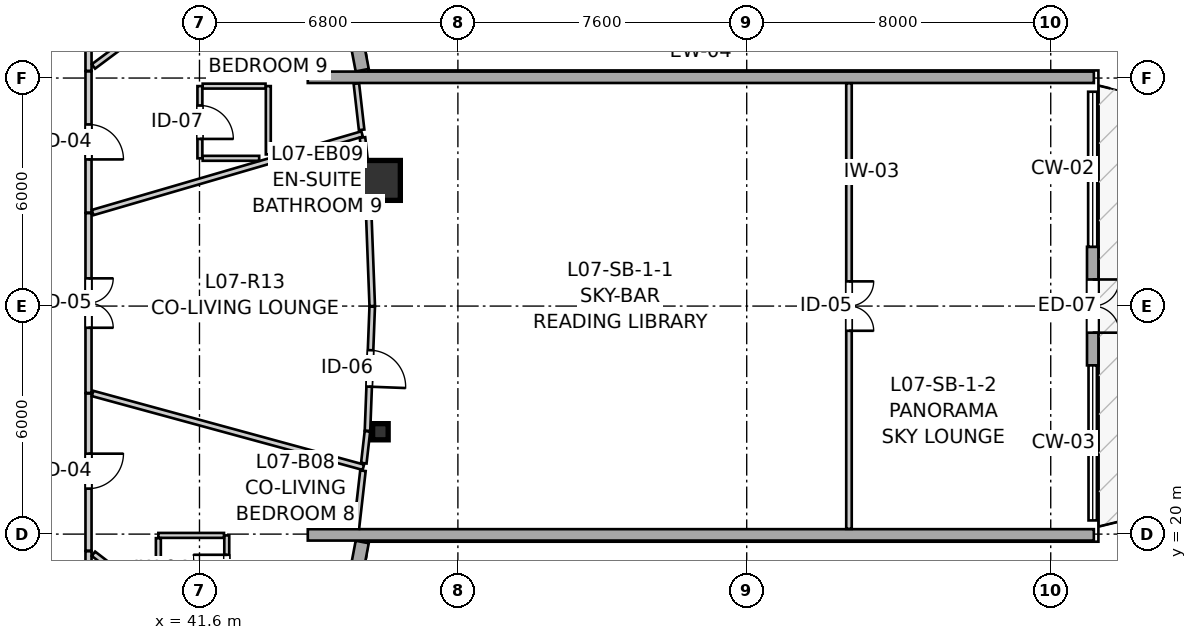
"""IFC4 building model, lengths in metres.
Left out: names, types, materials, properties, quantities, classifications, styles, units other than length and angle.
Written with IfcOpenShell. Run it as: python <this file> out.ifc"""

import sys

from ifc_helpers import new_model, si_unit, direction, frame, frame_2d, origin, origin_2d, place, context, subcontext, project, spatial, rectangle, i_section, extrude, source, transform, mapped, element, fill, save


model = new_model("IFC4")
c1 = context("Model", 3, precision=1e-05, world=origin(), true_north=direction((0.0, 1.0)))
c2 = subcontext(c1, "Body", "Model", "MODEL_VIEW")
j1 = project(units=[si_unit("LENGTHUNIT", "METRE"), si_unit("PLANEANGLEUNIT", "RADIAN")], contexts=[c1])
p1 = place(None, origin())
s1 = spatial("IfcSite", under=j1, at=p1, CompositionType="ELEMENT")
p2 = place(p1, origin())
s2 = spatial("IfcBuilding", under=s1, at=p2, CompositionType="ELEMENT")
p3 = place(p2, frame((0.0, 0.0, 27.0)))
s3 = spatial("IfcBuildingStorey", under=s2, at=p3, CompositionType="ELEMENT", Elevation=27.0)
m1 = source(origin(), c2, "Body", "SweptSolid", [
    extrude(i_section(OverallWidth=0.409, OverallDepth=0.425, WebThickness=0.03, FlangeThickness=0.048, FilletRadius=0.015, at=origin_2d()), origin(), (0.0, 0.0, 1.0), 2.935),
])
p4 = place(p3, frame((46.361, 22.694, 0.0), z_axis=(0.0, 0.0, 1.0), x_axis=(1.0, 0.0, 0.0)))
e1 = element("IfcColumn", 1, at=p4, inside=s3, PredefinedType="PILASTER", context=c2, shape_type="MappedRepresentation", body=[
    mapped(m1, transform((0.0, 0.0, 0.0), x_axis=(1.0, 0.0, 0.0), y_axis=(0.0, 1.0, 0.0), z_axis=(0.0, 0.0, 1.0), scale=1.0)),
])
m2 = source(origin(), c2, "Body", "SweptSolid", [
    extrude(rectangle(XDim=1.05, YDim=1.05, at=origin_2d()), origin(), (0.0, 0.0, 1.0), 2.935),
])
p5 = place(p3, frame((46.361, 29.306, 0.0), z_axis=(0.0, 0.0, 1.0), x_axis=(1.0, 0.0, 0.0)))
e2 = element("IfcColumn", 2, at=p5, inside=s3, PredefinedType="COLUMN", context=c2, shape_type="MappedRepresentation", body=[
    mapped(m2, transform((0.0, 0.0, 0.0), x_axis=(1.0, 0.0, 0.0), y_axis=(0.0, 1.0, 0.0), z_axis=(0.0, 0.0, 1.0), scale=1.0)),
])
p6 = place(p3, frame((45.24, 16.408, 0.0), z_axis=(0.0, 0.0, 1.0), x_axis=(0.186636709983, 0.982428999209, 0.0)))
e3 = element("IfcWall", 3, at=p6, inside=s3, PredefinedType="SOLIDWALL", context=c2, shape_type="SweptSolid", body=[
    extrude(rectangle(XDim=3.446, YDim=0.35, at=frame_2d((1.723, 0.0))), origin(), (0.0, 0.0, 1.0), 2.415),
])
p7 = place(p6, frame((0.828, 0.0, 0.82)))
e4 = element("IfcOpeningElement", 4, at=p7, cuts=e3, PredefinedType="OPENING", context=c2, shape_type="SweptSolid", body=[
    extrude(rectangle(XDim=1.45, YDim=1.25, at=frame_2d((0.725, 0.625))), frame((0.0, 0.185, 0.0), z_axis=(0.0, -1.0, 0.0), x_axis=(1.0, 0.0, 0.0)), (0.0, 0.0, 1.0), 0.37),
])
p8 = place(p3, frame((45.883, 32.207, 0.0), z_axis=(0.0, 0.0, 1.0), x_axis=(-0.186693533797, 0.982418202416, 0.0)))
e5 = element("IfcWall", 5, at=p8, inside=s3, PredefinedType="SOLIDWALL", context=c2, shape_type="SweptSolid", body=[
    extrude(rectangle(XDim=3.726, YDim=0.35, at=frame_2d((1.863, 0.0))), origin(), (0.0, 0.0, 1.0), 2.415),
])
p9 = place(p8, frame((1.313, 0.0, 0.82)))
e6 = element("IfcOpeningElement", 6, at=p9, cuts=e5, PredefinedType="OPENING", context=c2, shape_type="SweptSolid", body=[
    extrude(rectangle(XDim=1.45, YDim=1.25, at=frame_2d((0.725, 0.625))), frame((0.0, 0.185, 0.0), z_axis=(0.0, -1.0, 0.0), x_axis=(1.0, 0.0, 0.0)), (0.0, 0.0, 1.0), 0.37),
])
for number, where, z_axis, x_axis in (
    (7, (44.45, 32.02, 0.0), (0.0, 0.0, 1.0), (1.0, 0.0, 0.0)),
    (8, (44.45, 19.98, 0.0), (0.0, 0.0, 1.0), (1.0, 0.0, 0.0)),
):
    element("IfcWall", number, at=place(p3, frame(where, z_axis=z_axis, x_axis=x_axis)), inside=s3, PredefinedType="SOLIDWALL", context=c2, shape_type="SweptSolid", body=[
        extrude(rectangle(XDim=20.685, YDim=0.3, at=frame_2d((10.342, 0.0))), origin(), (0.0, 0.0, 1.0), 2.115),
    ])
p10 = place(p3, frame((65.104, 27.56, 0.0), z_axis=(0.0, 0.0, 1.0), x_axis=(0.0, -1.0, 0.0)))
e9 = element("IfcWall", 9, at=p10, inside=s3, PredefinedType="SOLIDWALL", context=c2, shape_type="SweptSolid", body=[
    extrude(rectangle(XDim=3.12, YDim=0.3, at=frame_2d((1.56, 0.0))), origin(), (0.0, 0.0, 1.0), 2.3),
])
p11 = place(p10, frame((0.86, 0.0, 0.0)))
e10 = element("IfcOpeningElement", 10, at=p11, cuts=e9, PredefinedType="OPENING", context=c2, shape_type="SweptSolid", body=[
    extrude(rectangle(XDim=1.4, YDim=2.15, at=frame_2d((0.7, 1.075))), frame((0.0, 0.16, 0.0), z_axis=(0.0, -1.0, 0.0), x_axis=(1.0, 0.0, 0.0)), (0.0, 0.0, 1.0), 0.32),
])
p12 = place(p3, frame((58.691, 31.862, 0.0), z_axis=(0.0, 0.0, 1.0), x_axis=(0.0, -1.0, 0.0)))
e11 = element("IfcWall", 11, at=p12, inside=s3, PredefinedType="PARTITIONING", context=c2, shape_type="SweptSolid", body=[
    extrude(rectangle(XDim=11.724, YDim=0.145, at=frame_2d((5.862, 0.0))), origin(), (0.0, 0.0, 1.0), 2.353),
])
p13 = place(p12, frame((5.212, 0.0, 0.0)))
e12 = element("IfcOpeningElement", 12, at=p13, cuts=e11, PredefinedType="OPENING", context=c2, shape_type="SweptSolid", body=[
    extrude(rectangle(XDim=1.3, YDim=2.1, at=frame_2d((0.65, 1.05))), frame((0.0, 0.083, 0.0), z_axis=(0.0, -1.0, 0.0), x_axis=(1.0, 0.0, 0.0)), (0.0, 0.0, 1.0), 0.165),
])
p14 = place(p3, frame((38.68, 28.445, 0.0), z_axis=(0.0, 0.0, 1.0), x_axis=(0.0, -1.0, 0.0)))
e13 = element("IfcWall", 13, at=p14, inside=s3, PredefinedType="PARTITIONING", context=c2, shape_type="SweptSolid", body=[
    extrude(rectangle(XDim=4.731, YDim=0.16, at=frame_2d((2.365, 0.0))), origin(), (0.0, 0.0, 1.0), 2.935),
])
p15 = place(p14, frame((1.716, 0.0, 0.0)))
e14 = element("IfcOpeningElement", 14, at=p15, cuts=e13, PredefinedType="OPENING", context=c2, shape_type="SweptSolid", body=[
    extrude(rectangle(XDim=1.3, YDim=2.1, at=frame_2d((0.65, 1.05))), frame((0.0, 0.09, 0.0), z_axis=(0.0, -1.0, 0.0), x_axis=(1.0, 0.0, 0.0)), (0.0, 0.0, 1.0), 0.18),
])
p16 = place(p3, frame((38.68, 36.58, 0.0), z_axis=(0.0, 0.0, 1.0), x_axis=(0.0, -1.0, 0.0)))
e15 = element("IfcWall", 15, at=p16, inside=s3, PredefinedType="PARTITIONING", context=c2, shape_type="SweptSolid", body=[
    extrude(rectangle(XDim=4.39, YDim=0.16, at=frame_2d((2.195, 0.0))), origin(), (0.0, 0.0, 1.0), 2.935),
])
p17 = place(p16, frame((1.726, 0.0, 0.0)))
e16 = element("IfcOpeningElement", 16, at=p17, cuts=e15, PredefinedType="OPENING", context=c2, shape_type="SweptSolid", body=[
    extrude(rectangle(XDim=0.92, YDim=2.1, at=frame_2d((0.46, 1.05))), frame((0.0, 0.09, 0.0), z_axis=(0.0, -1.0, 0.0), x_axis=(1.0, 0.0, 0.0)), (0.0, 0.0, 1.0), 0.18),
])
p18 = place(p3, frame((38.68, 23.699, 0.0), z_axis=(0.0, 0.0, 1.0), x_axis=(0.0, -1.0, 0.0)))
e17 = element("IfcWall", 17, at=p18, inside=s3, PredefinedType="PARTITIONING", context=c2, shape_type="SweptSolid", body=[
    extrude(rectangle(XDim=4.135, YDim=0.16, at=frame_2d((2.067, 0.0))), origin(), (0.0, 0.0, 1.0), 2.935),
])
p19 = place(p18, frame((1.583, 0.0, 0.0)))
e18 = element("IfcOpeningElement", 18, at=p19, cuts=e17, PredefinedType="OPENING", context=c2, shape_type="SweptSolid", body=[
    extrude(rectangle(XDim=0.92, YDim=2.1, at=frame_2d((0.46, 1.05))), frame((0.0, 0.09, 0.0), z_axis=(0.0, -1.0, 0.0), x_axis=(1.0, 0.0, 0.0)), (0.0, 0.0, 1.0), 0.18),
])
p20 = place(p3, frame((38.68, 32.175, 0.0), z_axis=(0.0, 0.0, 1.0), x_axis=(0.0, -1.0, 0.0)))
e19 = element("IfcWall", 19, at=p20, inside=s3, PredefinedType="PARTITIONING", context=c2, shape_type="SweptSolid", body=[
    extrude(rectangle(XDim=3.715, YDim=0.16, at=frame_2d((1.857, 0.0))), origin(), (0.0, 0.0, 1.0), 2.935),
])
p21 = place(p20, frame((1.396, 0.0, 0.0)))
e20 = element("IfcOpeningElement", 20, at=p21, cuts=e19, PredefinedType="OPENING", context=c2, shape_type="SweptSolid", body=[
    extrude(rectangle(XDim=0.92, YDim=2.1, at=frame_2d((0.46, 1.05))), frame((0.0, 0.09, 0.0), z_axis=(0.0, -1.0, 0.0), x_axis=(1.0, 0.0, 0.0)), (0.0, 0.0, 1.0), 0.18),
])
p22 = place(p3, frame((46.146, 25.985, 0.0), z_axis=(0.0, 0.0, 1.0), x_axis=(-0.038094618751, -0.999274136572, 0.0)))
e21 = element("IfcWall", 21, at=p22, inside=s3, PredefinedType="PARTITIONING", context=c2, shape_type="SweptSolid", body=[
    extrude(rectangle(XDim=3.269, YDim=0.145, at=frame_2d((1.634, 0.0))), origin(), (0.0, 0.0, 1.0), 2.403),
])
p23 = place(p22, frame((1.147, 0.0, 0.0)))
e22 = element("IfcOpeningElement", 22, at=p23, cuts=e21, PredefinedType="OPENING", context=c2, shape_type="SweptSolid", body=[
    extrude(rectangle(XDim=0.96, YDim=2.1, at=frame_2d((0.48, 1.05))), frame((0.0, 0.083, 0.0), z_axis=(0.0, -1.0, 0.0), x_axis=(1.0, 0.0, 0.0)), (0.0, 0.0, 1.0), 0.165),
])
p24 = place(p3, frame((38.68, 19.549, 0.0), z_axis=(0.0, 0.0, 1.0), x_axis=(0.0, -1.0, 0.0)))
e23 = element("IfcWall", 23, at=p24, inside=s3, PredefinedType="PARTITIONING", context=c2, shape_type="SweptSolid", body=[
    extrude(rectangle(XDim=2.331, YDim=0.16, at=frame_2d((1.166, 0.0))), origin(), (0.0, 0.0, 1.0), 2.935),
])
p25 = place(p24, frame((0.488, 0.0, 0.0)))
e24 = element("IfcOpeningElement", 24, at=p25, cuts=e23, PredefinedType="OPENING", context=c2, shape_type="SweptSolid", body=[
    extrude(rectangle(XDim=1.3, YDim=2.1, at=frame_2d((0.65, 1.05))), frame((0.0, 0.09, 0.0), z_axis=(0.0, -1.0, 0.0), x_axis=(1.0, 0.0, 0.0)), (0.0, 0.0, 1.0), 0.18),
])
p26 = place(p3, frame((42.318, 18.066, 0.0), z_axis=(0.0, 0.0, 1.0), x_axis=(0.0, 1.0, 0.0)))
e25 = element("IfcWall", 25, at=p26, inside=s3, PredefinedType="PARTITIONING", context=c2, shape_type="SweptSolid", body=[
    extrude(rectangle(XDim=1.9, YDim=0.13, at=frame_2d((0.95, 0.0))), origin(), (0.0, 0.0, 1.0), 2.935),
])
p27 = place(p26, frame((0.51, 0.0, 0.0)))
e26 = element("IfcOpeningElement", 26, at=p27, cuts=e25, PredefinedType="OPENING", context=c2, shape_type="SweptSolid", body=[
    extrude(rectangle(XDim=0.88, YDim=2.05, at=frame_2d((0.44, 1.025))), frame((0.0, 0.075, 0.0), z_axis=(0.0, -1.0, 0.0), x_axis=(1.0, 0.0, 0.0)), (0.0, 0.0, 1.0), 0.15),
])
p28 = place(p3, frame((41.611, 31.788, 0.0), z_axis=(0.0, 0.0, 1.0), x_axis=(0.0, -1.0, 0.0)))
e27 = element("IfcWall", 27, at=p28, inside=s3, PredefinedType="PARTITIONING", context=c2, shape_type="SweptSolid", body=[
    extrude(rectangle(XDim=1.9, YDim=0.13, at=frame_2d((0.95, 0.0))), origin(), (0.0, 0.0, 1.0), 2.935),
])
p29 = place(p28, frame((0.51, 0.0, 0.0)))
e28 = element("IfcOpeningElement", 28, at=p29, cuts=e27, PredefinedType="OPENING", context=c2, shape_type="SweptSolid", body=[
    extrude(rectangle(XDim=0.88, YDim=2.05, at=frame_2d((0.44, 1.025))), frame((0.0, 0.075, 0.0), z_axis=(0.0, -1.0, 0.0), x_axis=(1.0, 0.0, 0.0)), (0.0, 0.0, 1.0), 0.15),
])
p30 = place(p3, frame((38.81, 32.306, 0.0), z_axis=(0.0, 0.0, 1.0), x_axis=(0.801799720797, 0.597592844443, 0.0)))
e29 = element("IfcWall", 29, at=p30, inside=s3, PredefinedType="PARTITIONING", context=c2, shape_type="SweptSolid", body=[
    extrude(rectangle(XDim=7.424, YDim=0.145, at=frame_2d((3.712, 0.0))), origin(), (0.0, 0.0, 1.0), 2.935),
])
p31 = place(p3, frame((38.788, 28.46, 0.0), z_axis=(0.0, 0.0, 1.0), x_axis=(0.959983709987, 0.280055845432, 0.0)))
e30 = element("IfcWall", 30, at=p31, inside=s3, PredefinedType="PARTITIONING", context=c2, shape_type="SweptSolid", body=[
    extrude(rectangle(XDim=7.386, YDim=0.145, at=frame_2d((3.693, 0.0))), origin(), (0.0, 0.0, 1.0), 2.935),
])
p32 = place(p3, frame((38.787, 23.701, 0.0), z_axis=(0.0, 0.0, 1.0), x_axis=(0.964810342249, -0.262946769308, 0.0)))
e31 = element("IfcWall", 31, at=p32, inside=s3, PredefinedType="PARTITIONING", context=c2, shape_type="SweptSolid", body=[
    extrude(rectangle(XDim=7.385, YDim=0.145, at=frame_2d((3.692, 0.0))), origin(), (0.0, 0.0, 1.0), 2.935),
])
p33 = place(p3, frame((46.021, 29.281, 0.0), z_axis=(0.0, 0.0, 1.0), x_axis=(0.038070453861, -0.999275057501, 0.0)))
e32 = element("IfcWall", 32, at=p33, inside=s3, PredefinedType="PARTITIONING", context=c2, shape_type="SweptSolid", body=[
    extrude(rectangle(XDim=3.283, YDim=0.145, at=frame_2d((1.642, 0.0))), origin(), (0.0, 0.0, 1.0), 2.403),
])
p34 = place(p3, frame((38.811, 19.482, 0.0), z_axis=(0.0, 0.0, 1.0), x_axis=(0.792185877025, -0.61027988353, 0.0)))
e33 = element("IfcWall", 33, at=p34, inside=s3, PredefinedType="PARTITIONING", context=c2, shape_type="SweptSolid", body=[
    extrude(rectangle(XDim=2.156, YDim=0.145, at=frame_2d((1.078, 0.0))), origin(), (0.0, 0.0, 1.0), 2.935),
])
p35 = place(p3, frame((43.411, 29.99, 0.0), z_axis=(0.0, 0.0, 1.0), x_axis=(0.0, 1.0, 0.0)))
e34 = element("IfcWall", 34, at=p35, inside=s3, PredefinedType="PARTITIONING", context=c2, shape_type="SweptSolid", body=[
    extrude(rectangle(XDim=1.798, YDim=0.13, at=frame_2d((0.899, 0.0))), origin(), (0.0, 0.0, 1.0), 2.935),
])
p36 = place(p3, frame((41.684, 31.788, 0.0), z_axis=(0.0, 0.0, 1.0), x_axis=(1.0, 0.0, 0.0)))
e35 = element("IfcWall", 35, at=p36, inside=s3, PredefinedType="PARTITIONING", context=c2, shape_type="SweptSolid", body=[
    extrude(rectangle(XDim=1.654, YDim=0.13, at=frame_2d((0.827, 0.0))), origin(), (0.0, 0.0, 1.0), 2.103),
])
p37 = place(p3, frame((41.684, 29.888, 0.0), z_axis=(0.0, 0.0, 1.0), x_axis=(1.0, 0.0, 0.0)))
e36 = element("IfcWall", 36, at=p37, inside=s3, PredefinedType="PARTITIONING", context=c2, shape_type="SweptSolid", body=[
    extrude(rectangle(XDim=1.487, YDim=0.13, at=frame_2d((0.743, 0.0))), origin(), (0.0, 0.0, 1.0), 2.935),
])
p38 = place(p3, frame((40.518, 19.966, 0.0), z_axis=(0.0, 0.0, 1.0), x_axis=(1.0, 0.0, 0.0)))
e37 = element("IfcWall", 37, at=p38, inside=s3, PredefinedType="PARTITIONING", context=c2, shape_type="SweptSolid", body=[
    extrude(rectangle(XDim=1.727, YDim=0.13, at=frame_2d((0.864, 0.0))), origin(), (0.0, 0.0, 1.0), 2.103),
])
p39 = place(p3, frame((40.518, 18.317, 0.0), z_axis=(0.0, 0.0, 1.0), x_axis=(0.0, 1.0, 0.0)))
e38 = element("IfcWall", 38, at=p39, inside=s3, PredefinedType="PARTITIONING", context=c2, shape_type="SweptSolid", body=[
    extrude(rectangle(XDim=1.576, YDim=0.13, at=frame_2d((0.788, 0.0))), origin(), (0.0, 0.0, 1.0), 2.935),
])
p40 = place(p3, frame((45.729, 20.146, 0.0), z_axis=(0.0, 0.0, 1.0), x_axis=(0.113074294354, 0.993586535716, 0.0)))
e39 = element("IfcWall", 39, at=p40, inside=s3, PredefinedType="PARTITIONING", context=c2, shape_type="SweptSolid", body=[
    extrude(rectangle(XDim=1.531, YDim=0.145, at=frame_2d((0.765, 0.0))), origin(), (0.0, 0.0, 1.0), 2.403),
])
p41 = place(p3, frame((45.89, 30.436, 0.0), z_axis=(0.0, 0.0, 1.0), x_axis=(0.113024308153, -0.993592223081, 0.0)))
e40 = element("IfcWall", 40, at=p41, inside=s3, PredefinedType="PARTITIONING", context=c2, shape_type="SweptSolid", body=[
    extrude(rectangle(XDim=1.147, YDim=0.145, at=frame_2d((0.573, 0.0))), origin(), (0.0, 0.0, 1.0), 2.403),
])
p42 = place(p3, frame((45.729, 31.854, 0.0), z_axis=(0.0, 0.0, 1.0), x_axis=(0.112860473391, -0.993610846129, 0.0)))
e41 = element("IfcWall", 41, at=p42, inside=s3, PredefinedType="PARTITIONING", context=c2, shape_type="SweptSolid", body=[
    extrude(rectangle(XDim=1.224, YDim=0.145, at=frame_2d((0.612, 0.0))), origin(), (0.0, 0.0, 1.0), 2.403),
])
p43 = place(p3, frame((45.924, 21.866, 0.0), z_axis=(0.0, 0.0, 1.0), x_axis=(0.112844765803, 0.993612630169, 0.0)))
e42 = element("IfcWall", 42, at=p43, inside=s3, PredefinedType="PARTITIONING", context=c2, shape_type="SweptSolid", body=[
    extrude(rectangle(XDim=0.844, YDim=0.145, at=frame_2d((0.422, 0.0))), origin(), (0.0, 0.0, 1.0), 2.403),
])
m3 = source(origin(), c2, "Body", "SweptSolid", [
    extrude(rectangle(XDim=1.4, YDim=2.15, at=frame_2d((0.7, 1.075))), frame((0.0, 0.025, 0.0), z_axis=(0.0, -1.0, 0.0), x_axis=(1.0, 0.0, 0.0)), (0.0, 0.0, 1.0), 0.05),
])
p44 = place(p11, origin())
e43 = element("IfcDoor", 43, at=p44, inside=s3, OperationType="DOUBLE_DOOR_SINGLE_SWING", PredefinedType="DOOR", context=c2, shape_type="MappedRepresentation", body=[
    mapped(m3, transform((0.0, 0.0, 0.0), x_axis=(1.0, 0.0, 0.0), y_axis=(0.0, 1.0, 0.0), z_axis=(0.0, 0.0, 1.0), scale=1.0)),
])
fill(e10, e43)
m4 = source(origin(), c2, "Body", "SweptSolid", [
    extrude(rectangle(XDim=1.3, YDim=2.1, at=frame_2d((0.65, 1.05))), frame((0.0, 0.025, 0.0), z_axis=(0.0, -1.0, 0.0), x_axis=(1.0, 0.0, 0.0)), (0.0, 0.0, 1.0), 0.05),
])
p45 = place(p13, origin())
e44 = element("IfcDoor", 44, at=p45, inside=s3, OperationType="DOUBLE_DOOR_SINGLE_SWING", PredefinedType="DOOR", context=c2, shape_type="MappedRepresentation", body=[
    mapped(m4, transform((0.0, 0.0, 0.0), x_axis=(1.0, 0.0, 0.0), y_axis=(0.0, 1.0, 0.0), z_axis=(0.0, 0.0, 1.0), scale=1.0)),
])
fill(e12, e44)
p46 = place(p15, origin())
e45 = element("IfcDoor", 45, at=p46, inside=s3, OperationType="DOUBLE_DOOR_SINGLE_SWING", PredefinedType="DOOR", context=c2, shape_type="MappedRepresentation", body=[
    mapped(m4, transform((0.0, 0.0, 0.0), x_axis=(1.0, 0.0, 0.0), y_axis=(0.0, 1.0, 0.0), z_axis=(0.0, 0.0, 1.0), scale=1.0)),
])
fill(e14, e45)
m5 = source(origin(), c2, "Body", "SweptSolid", [
    extrude(rectangle(XDim=0.92, YDim=2.1, at=frame_2d((0.46, 1.05))), frame((0.0, 0.025, 0.0), z_axis=(0.0, -1.0, 0.0), x_axis=(1.0, 0.0, 0.0)), (0.0, 0.0, 1.0), 0.05),
])
p47 = place(p19, origin())
e46 = element("IfcDoor", 46, at=p47, inside=s3, OperationType="SINGLE_SWING_LEFT", PredefinedType="DOOR", context=c2, shape_type="MappedRepresentation", body=[
    mapped(m5, transform((0.0, 0.0, 0.0), x_axis=(1.0, 0.0, 0.0), y_axis=(0.0, 1.0, 0.0), z_axis=(0.0, 0.0, 1.0), scale=1.0)),
])
fill(e18, e46)
p48 = place(p21, origin())
e47 = element("IfcDoor", 47, at=p48, inside=s3, OperationType="SINGLE_SWING_RIGHT", PredefinedType="DOOR", context=c2, shape_type="MappedRepresentation", body=[
    mapped(m5, transform((0.0, 0.0, 0.0), x_axis=(1.0, 0.0, 0.0), y_axis=(0.0, 1.0, 0.0), z_axis=(0.0, 0.0, 1.0), scale=1.0)),
])
fill(e20, e47)
m6 = source(origin(), c2, "Body", "SweptSolid", [
    extrude(rectangle(XDim=0.96, YDim=2.1, at=frame_2d((0.48, 1.05))), frame((0.0, 0.025, 0.0), z_axis=(0.0, -1.0, 0.0), x_axis=(1.0, 0.0, 0.0)), (0.0, 0.0, 1.0), 0.05),
])
p49 = place(p23, origin())
e48 = element("IfcDoor", 48, at=p49, inside=s3, OperationType="SINGLE_SWING_RIGHT", PredefinedType="DOOR", context=c2, shape_type="MappedRepresentation", body=[
    mapped(m6, transform((0.0, 0.0, 0.0), x_axis=(1.0, 0.0, 0.0), y_axis=(0.0, 1.0, 0.0), z_axis=(0.0, 0.0, 1.0), scale=1.0)),
])
fill(e22, e48)
m7 = source(origin(), c2, "Body", "SweptSolid", [
    extrude(rectangle(XDim=0.88, YDim=2.05, at=frame_2d((0.44, 1.025))), frame((0.0, 0.025, 0.0), z_axis=(0.0, -1.0, 0.0), x_axis=(1.0, 0.0, 0.0)), (0.0, 0.0, 1.0), 0.05),
])
p50 = place(p27, origin())
e49 = element("IfcDoor", 49, at=p50, inside=s3, OperationType="SINGLE_SWING_RIGHT", PredefinedType="DOOR", context=c2, shape_type="MappedRepresentation", body=[
    mapped(m7, transform((0.0, 0.0, 0.0), x_axis=(1.0, 0.0, 0.0), y_axis=(0.0, 1.0, 0.0), z_axis=(0.0, 0.0, 1.0), scale=1.0)),
])
fill(e26, e49)
p51 = place(p29, origin())
e50 = element("IfcDoor", 50, at=p51, inside=s3, OperationType="SINGLE_SWING_RIGHT", PredefinedType="DOOR", context=c2, shape_type="MappedRepresentation", body=[
    mapped(m7, transform((0.0, 0.0, 0.0), x_axis=(1.0, 0.0, 0.0), y_axis=(0.0, 1.0, 0.0), z_axis=(0.0, 0.0, 1.0), scale=1.0)),
])
fill(e28, e50)
save(model, sys.argv[1])
